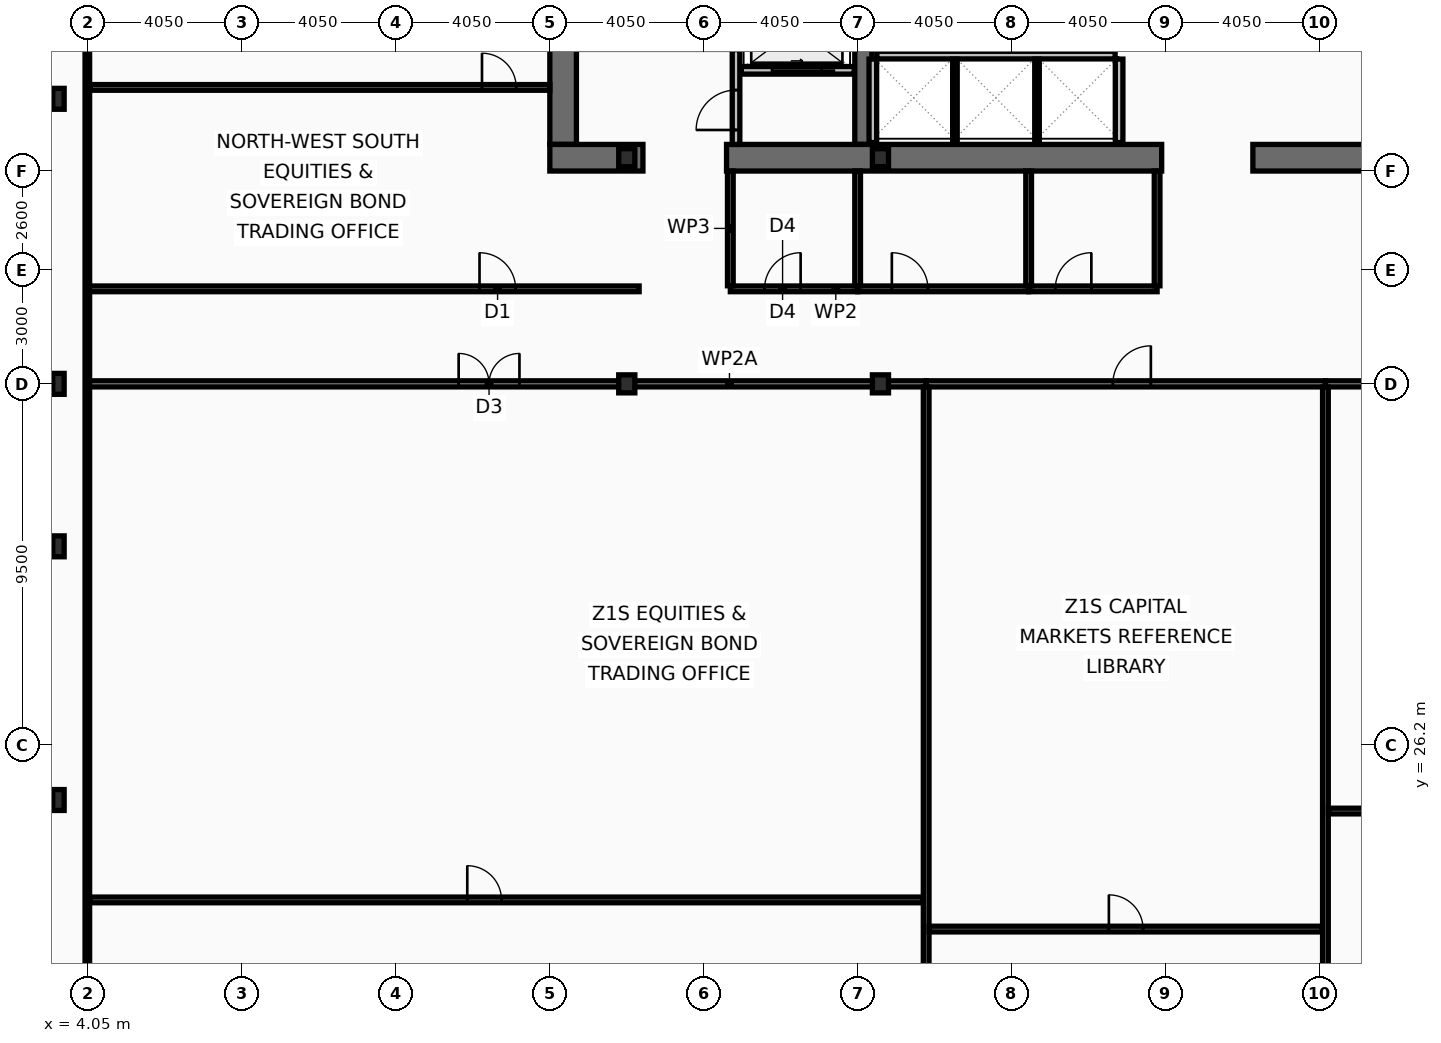
"""IFC4 building model, lengths in metres.
Left out: names, types, materials, properties, quantities, classifications, styles, units other than length and angle.
Written with IfcOpenShell. Run it as: python <this file> out.ifc"""

import sys

from ifc_helpers import new_model, si_unit, direction, frame, frame_2d, origin, origin_2d, place, context, subcontext, project, spatial, rectangle, i_section, extrude, element, fill, save


model = new_model("IFC4")
c1 = context("Model", 3, precision=1e-05, world=origin(), true_north=direction((0.0, 1.0)))
c2 = subcontext(c1, "Body", "Model", "MODEL_VIEW")
j1 = project(units=[si_unit("LENGTHUNIT", "METRE"), si_unit("PLANEANGLEUNIT", "RADIAN")], contexts=[c1])
p1 = place(None, origin())
s1 = spatial("IfcSite", under=j1, at=p1, CompositionType="ELEMENT")
p2 = place(p1, origin())
s2 = spatial("IfcBuilding", under=s1, at=p2, CompositionType="ELEMENT")
p3 = place(p2, frame((0.0, 0.0, 90.6)))
s3 = spatial("IfcBuildingStorey", under=s2, at=p3, CompositionType="ELEMENT", Elevation=90.6)
p4 = place(p3, frame((16.55, 42.0, 0.0), z_axis=(0.0, 0.0, 1.0), x_axis=(0.0, 1.0, 0.0)))
e1 = element("IfcWall", 1, at=p4, inside=s3, PredefinedType="SHEAR", context=c2, shape_type="SweptSolid", body=[
    extrude(rectangle(XDim=11.0, YDim=0.7, at=frame_2d((5.5, 0.0))), origin(), (0.0, 0.0, 1.0), 3.82),
])
p5 = place(p3, frame((24.45, 42.0, 0.0), z_axis=(0.0, 0.0, 1.0), x_axis=(0.0, 1.0, 0.0)))
e2 = element("IfcWall", 2, at=p5, inside=s3, PredefinedType="SHEAR", context=c2, shape_type="SweptSolid", body=[
    extrude(rectangle(XDim=11.0, YDim=0.45, at=frame_2d((5.5, 0.0))), origin(), (0.0, 0.0, 1.0), 3.82),
])
p6 = place(p3, frame((18.65, 41.65, 0.0), z_axis=(0.0, 0.0, 1.0), x_axis=(-1.0, 0.0, 0.0)))
e3 = element("IfcWall", 3, at=p6, inside=s3, PredefinedType="SHEAR", context=c2, shape_type="SweptSolid", body=[
    extrude(rectangle(XDim=2.45, YDim=0.7, at=frame_2d((1.225, 0.0))), origin(), (0.0, 0.0, 1.0), 3.82),
])
p7 = place(p3, frame((32.3, 41.65, 0.0), z_axis=(0.0, 0.0, 1.0), x_axis=(-1.0, 0.0, 0.0)))
e4 = element("IfcWall", 4, at=p7, inside=s3, PredefinedType="SHEAR", context=c2, shape_type="SweptSolid", body=[
    extrude(rectangle(XDim=11.45, YDim=0.7, at=frame_2d((5.725, 0.0))), origin(), (0.0, 0.0, 1.0), 3.82),
])
p8 = place(p3, frame((38.45, 41.65, 0.0), z_axis=(0.0, 0.0, 1.0), x_axis=(-1.0, 0.0, 0.0)))
e5 = element("IfcWall", 5, at=p8, inside=s3, PredefinedType="SHEAR", context=c2, shape_type="SweptSolid", body=[
    extrude(rectangle(XDim=3.75, YDim=0.7, at=frame_2d((1.875, 0.0))), origin(), (0.0, 0.0, 1.0), 3.82),
])
for number, where, z_axis, x_axis in (
    (6, (3.27, 24.75, 0.0), (0.0, 0.0, 1.0), (1.0, 0.0, 0.0)),
    (7, (3.27, 31.425, 0.0), (0.0, 0.0, 1.0), (1.0, 0.0, 0.0)),
    (8, (3.27, 35.7, 0.0), (0.0, 0.0, 1.0), (1.0, 0.0, 0.0)),
    (9, (3.27, 43.2, 0.0), (0.0, 0.0, 1.0), (1.0, 0.0, 0.0)),
):
    element("IfcColumn", number, at=place(p3, frame(where, z_axis=z_axis, x_axis=x_axis)), inside=s3, PredefinedType="COLUMN", context=c2, shape_type="SweptSolid", body=[
        extrude(i_section(OverallWidth=0.3, OverallDepth=0.55, WebThickness=0.015, FlangeThickness=0.029, at=origin_2d()), origin(), (0.0, 0.0, 1.0), 4.0),
    ])
for number, where, z_axis, x_axis in (
    (10, (18.225, 35.7, 0.0), (0.0, 0.0, 1.0), (1.0, 0.0, 0.0)),
    (11, (18.225, 41.65, 0.0), (0.0, 0.0, 1.0), (1.0, 0.0, 0.0)),
    (12, (24.9, 35.7, 0.0), (0.0, 0.0, 1.0), (1.0, 0.0, 0.0)),
    (13, (24.9, 41.65, 0.0), (0.0, 0.0, 1.0), (1.0, 0.0, 0.0)),
):
    element("IfcColumn", number, at=place(p3, frame(where, z_axis=z_axis, x_axis=x_axis)), inside=s3, PredefinedType="COLUMN", context=c2, shape_type="SweptSolid", body=[
        extrude(i_section(OverallWidth=0.424, OverallDepth=0.474, WebThickness=0.048, FlangeThickness=0.077, at=origin_2d()), origin(), (0.0, 0.0, 1.0), 4.0),
    ])
p9 = place(p3, frame((24.21, 43.95, 0.0), z_axis=(0.0, 0.0, 1.0), x_axis=(-1.0, 0.0, 0.0)))
e14 = element("IfcWall", 14, at=p9, inside=s3, PredefinedType="PARTITIONING", context=c2, shape_type="SweptSolid", body=[
    extrude(rectangle(XDim=2.97, YDim=0.2, at=frame_2d((1.485, 0.0))), origin(), (0.0, 0.0, 1.0), 3.82),
])
p10 = place(p9, frame((0.86, 0.0, 0.0)))
e15 = element("IfcOpeningElement", 15, at=p10, cuts=e14, PredefinedType="OPENING", context=c2, shape_type="SweptSolid", body=[
    extrude(rectangle(XDim=1.3, YDim=2.18, at=frame_2d((0.65, 1.09))), frame((0.0, 0.11, 0.0), z_axis=(0.0, -1.0, 0.0), x_axis=(1.0, 0.0, 0.0)), (0.0, 0.0, 1.0), 0.22),
])
p11 = place(p3, frame((21.1, 42.0, 0.0), z_axis=(0.0, 0.0, 1.0), x_axis=(0.0, 1.0, 0.0)))
e16 = element("IfcWall", 16, at=p11, inside=s3, PredefinedType="PARTITIONING", context=c2, shape_type="SweptSolid", body=[
    extrude(rectangle(XDim=2.495, YDim=0.2, at=frame_2d((1.248, 0.0))), origin(), (0.0, 0.0, 1.0), 3.82),
])
p12 = place(p11, frame((0.38, 0.0, 0.0)))
e17 = element("IfcOpeningElement", 17, at=p12, cuts=e16, PredefinedType="OPENING", context=c2, shape_type="SweptSolid", body=[
    extrude(rectangle(XDim=1.05, YDim=2.15, at=frame_2d((0.525, 1.075))), frame((0.0, 0.11, 0.0), z_axis=(0.0, -1.0, 0.0), x_axis=(1.0, 0.0, 0.0)), (0.0, 0.0, 1.0), 0.22),
])
p13 = place(p3, frame((24.805, 44.35, 0.0), z_axis=(0.0, 0.0, 1.0), x_axis=(1.0, 0.0, 0.0)))
e18 = element("IfcWall", 18, at=p13, inside=s3, PredefinedType="PARTITIONING", context=c2, shape_type="SweptSolid", body=[
    extrude(rectangle(XDim=6.27, YDim=0.2, at=frame_2d((3.135, 0.0))), origin(), (0.0, 0.0, 1.0), 3.82),
])
for number, where, z_axis, x_axis in (
    (19, (24.7, 42.05, 0.0), (0.0, 0.0, 1.0), (0.0, 1.0, 0.0)),
    (20, (31.18, 42.05, 0.0), (0.0, 0.0, 1.0), (0.0, 1.0, 0.0)),
):
    element("IfcWall", number, at=place(p3, frame(where, z_axis=z_axis, x_axis=x_axis)), inside=s3, PredefinedType="PARTITIONING", context=c2, shape_type="SweptSolid", body=[
        extrude(rectangle(XDim=2.195, YDim=0.2, at=frame_2d((1.098, 0.0))), origin(), (0.0, 0.0, 1.0), 3.82),
    ])
for number, where, z_axis, x_axis in (
    (21, (26.86, 42.05, 0.0), (0.0, 0.0, 1.0), (0.0, 1.0, 0.0)),
    (22, (29.02, 42.05, 0.0), (0.0, 0.0, 1.0), (0.0, 1.0, 0.0)),
):
    element("IfcWall", number, at=place(p3, frame(where, z_axis=z_axis, x_axis=x_axis)), inside=s3, PredefinedType="PARTITIONING", context=c2, shape_type="SweptSolid", body=[
        extrude(rectangle(XDim=2.195, YDim=0.12, at=frame_2d((1.098, 0.0))), origin(), (0.0, 0.0, 1.0), 3.82),
    ])
p14 = place(p3, frame((20.95, 38.2, 0.0), z_axis=(0.0, 0.0, 1.0), x_axis=(1.0, 0.0, 0.0)))
e23 = element("IfcWall", 23, at=p14, inside=s3, PredefinedType="PARTITIONING", context=c2, shape_type="SweptSolid", body=[
    extrude(rectangle(XDim=3.35, YDim=0.15, at=frame_2d((1.675, 0.0))), origin(), (0.0, 0.0, 1.0), 3.82),
])
p15 = place(p14, frame((0.9, 0.0, 0.0)))
e24 = element("IfcOpeningElement", 24, at=p15, cuts=e23, PredefinedType="OPENING", context=c2, shape_type="SweptSolid", body=[
    extrude(rectangle(XDim=0.95, YDim=2.05, at=frame_2d((0.475, 1.025))), frame((0.0, 0.085, 0.0), z_axis=(0.0, -1.0, 0.0), x_axis=(1.0, 0.0, 0.0)), (0.0, 0.0, 1.0), 0.17),
])
p16 = place(p3, frame((24.3, 38.2, 0.0), z_axis=(0.0, 0.0, 1.0), x_axis=(1.0, 0.0, 0.0)))
e25 = element("IfcWall", 25, at=p16, inside=s3, PredefinedType="PARTITIONING", context=c2, shape_type="SweptSolid", body=[
    extrude(rectangle(XDim=4.5, YDim=0.15, at=frame_2d((2.25, 0.0))), origin(), (0.0, 0.0, 1.0), 3.01),
])
p17 = place(p16, frame((0.9, 0.0, 0.0)))
e26 = element("IfcOpeningElement", 26, at=p17, cuts=e25, PredefinedType="OPENING", context=c2, shape_type="SweptSolid", body=[
    extrude(rectangle(XDim=0.95, YDim=2.05, at=frame_2d((0.475, 1.025))), frame((0.0, 0.085, 0.0), z_axis=(0.0, -1.0, 0.0), x_axis=(1.0, 0.0, 0.0)), (0.0, 0.0, 1.0), 0.17),
])
p18 = place(p3, frame((28.8, 38.2, 0.0), z_axis=(0.0, 0.0, 1.0), x_axis=(1.0, 0.0, 0.0)))
e27 = element("IfcWall", 27, at=p18, inside=s3, PredefinedType="PARTITIONING", context=c2, shape_type="SweptSolid", body=[
    extrude(rectangle(XDim=3.38, YDim=0.15, at=frame_2d((1.69, 0.0))), origin(), (0.0, 0.0, 1.0), 3.01),
])
p19 = place(p18, frame((0.7, 0.0, 0.0)))
e28 = element("IfcOpeningElement", 28, at=p19, cuts=e27, PredefinedType="OPENING", context=c2, shape_type="SweptSolid", body=[
    extrude(rectangle(XDim=0.95, YDim=2.05, at=frame_2d((0.475, 1.025))), frame((0.0, 0.085, 0.0), z_axis=(0.0, -1.0, 0.0), x_axis=(1.0, 0.0, 0.0)), (0.0, 0.0, 1.0), 0.17),
])
for number, where, z_axis, x_axis in (
    (29, (20.95, 38.28, 0.0), (0.0, 0.0, 1.0), (0.0, 1.0, 0.0)),
    (30, (24.3, 38.28, 0.0), (0.0, 0.0, 1.0), (0.0, 1.0, 0.0)),
    (31, (28.8, 38.28, 0.0), (0.0, 0.0, 1.0), (0.0, 1.0, 0.0)),
    (32, (32.18, 38.28, 0.0), (0.0, 0.0, 1.0), (0.0, 1.0, 0.0)),
):
    element("IfcWall", number, at=place(p3, frame(where, z_axis=z_axis, x_axis=x_axis)), inside=s3, PredefinedType="PARTITIONING", context=c2, shape_type="SweptSolid", body=[
        extrude(rectangle(XDim=3.02, YDim=0.15, at=frame_2d((1.51, 0.0))), origin(), (0.0, 0.0, 1.0), 3.82),
    ])
p20 = place(p3, frame((4.03, 38.2, 0.0), z_axis=(0.0, 0.0, 1.0), x_axis=(1.0, 0.0, 0.0)))
e33 = element("IfcWall", 33, at=p20, inside=s3, PredefinedType="PARTITIONING", context=c2, shape_type="SweptSolid", body=[
    extrude(rectangle(XDim=14.52, YDim=0.15, at=frame_2d((7.26, 0.0))), origin(), (0.0, 0.0, 1.0), 3.01),
])
p21 = place(p20, frame((10.32, 0.0, 0.0)))
e34 = element("IfcOpeningElement", 34, at=p21, cuts=e33, PredefinedType="OPENING", context=c2, shape_type="SweptSolid", body=[
    extrude(rectangle(XDim=0.95, YDim=2.05, at=frame_2d((0.475, 1.025))), frame((0.0, 0.085, 0.0), z_axis=(0.0, -1.0, 0.0), x_axis=(1.0, 0.0, 0.0)), (0.0, 0.0, 1.0), 0.17),
])
p22 = place(p3, frame((4.095, 43.5, 0.0), z_axis=(0.0, 0.0, 1.0), x_axis=(1.0, 0.0, 0.0)))
e35 = element("IfcWall", 35, at=p22, inside=s3, PredefinedType="PARTITIONING", context=c2, shape_type="SweptSolid", body=[
    extrude(rectangle(XDim=12.105, YDim=0.15, at=frame_2d((6.052, 0.0))), origin(), (0.0, 0.0, 1.0), 3.01),
])
p23 = place(p22, frame((10.32, 0.0, 0.0)))
e36 = element("IfcOpeningElement", 36, at=p23, cuts=e35, PredefinedType="OPENING", context=c2, shape_type="SweptSolid", body=[
    extrude(rectangle(XDim=0.9, YDim=2.05, at=frame_2d((0.45, 1.025))), frame((0.0, 0.085, 0.0), z_axis=(0.0, -1.0, 0.0), x_axis=(1.0, 0.0, 0.0)), (0.0, 0.0, 1.0), 0.17),
])
p24 = place(p3, frame((4.03, 35.7, 0.0), z_axis=(0.0, 0.0, 1.0), x_axis=(1.0, 0.0, 0.0)))
e37 = element("IfcWall", 37, at=p24, inside=s3, PredefinedType="PARTITIONING", context=c2, shape_type="SweptSolid", body=[
    extrude(rectangle(XDim=22.073, YDim=0.16, at=frame_2d((11.037, 0.0))), origin(), (0.0, 0.0, 1.0), 3.01),
])
p25 = place(p24, frame((9.771, 0.0, 0.0)))
e38 = element("IfcOpeningElement", 38, at=p25, cuts=e37, PredefinedType="OPENING", context=c2, shape_type="SweptSolid", body=[
    extrude(rectangle(XDim=1.6, YDim=2.15, at=frame_2d((0.8, 1.075))), frame((0.0, 0.09, 0.0), z_axis=(0.0, -1.0, 0.0), x_axis=(1.0, 0.0, 0.0)), (0.0, 0.0, 1.0), 0.18),
])
p26 = place(p3, frame((4.095, 22.121, 0.0), z_axis=(0.0, 0.0, 1.0), x_axis=(1.0, 0.0, 0.0)))
e39 = element("IfcWall", 39, at=p26, inside=s3, PredefinedType="PARTITIONING", context=c2, shape_type="SweptSolid", body=[
    extrude(rectangle(XDim=21.928, YDim=0.15, at=frame_2d((10.964, 0.0))), origin(), (0.0, 0.0, 1.0), 3.01),
])
p27 = place(p26, frame((9.933, 0.0, 0.0)))
e40 = element("IfcOpeningElement", 40, at=p27, cuts=e39, PredefinedType="OPENING", context=c2, shape_type="SweptSolid", body=[
    extrude(rectangle(XDim=0.9, YDim=2.05, at=frame_2d((0.45, 1.025))), frame((0.0, 0.085, 0.0), z_axis=(0.0, -1.0, 0.0), x_axis=(1.0, 0.0, 0.0)), (0.0, 0.0, 1.0), 0.17),
])
p28 = place(p3, frame((26.103, 35.7, 0.0), z_axis=(0.0, 0.0, 1.0), x_axis=(1.0, 0.0, 0.0)))
e41 = element("IfcWall", 41, at=p28, inside=s3, PredefinedType="PARTITIONING", context=c2, shape_type="SweptSolid", body=[
    extrude(rectangle(XDim=10.506, YDim=0.16, at=frame_2d((5.253, 0.0))), origin(), (0.0, 0.0, 1.0), 3.01),
])
p29 = place(p28, frame((4.913, 0.0, 0.0)))
e42 = element("IfcOpeningElement", 42, at=p29, cuts=e41, PredefinedType="OPENING", context=c2, shape_type="SweptSolid", body=[
    extrude(rectangle(XDim=1.0, YDim=2.05, at=frame_2d((0.5, 1.025))), frame((0.0, 0.09, 0.0), z_axis=(0.0, -1.0, 0.0), x_axis=(1.0, 0.0, 0.0)), (0.0, 0.0, 1.0), 0.18),
])
p30 = place(p3, frame((26.103, 10.665, 0.0), z_axis=(0.0, 0.0, 1.0), x_axis=(0.0, 1.0, 0.0)))
e43 = element("IfcWall", 43, at=p30, inside=s3, PredefinedType="PARTITIONING", context=c2, shape_type="SweptSolid", body=[
    extrude(rectangle(XDim=24.95, YDim=0.15, at=frame_2d((12.475, 0.0))), origin(), (0.0, 0.0, 1.0), 3.26),
])
p31 = place(p3, frame((26.183, 21.354, 0.0), z_axis=(0.0, 0.0, 1.0), x_axis=(1.0, 0.0, 0.0)))
e44 = element("IfcWall", 44, at=p31, inside=s3, PredefinedType="PARTITIONING", context=c2, shape_type="SweptSolid", body=[
    extrude(rectangle(XDim=10.346, YDim=0.15, at=frame_2d((5.173, 0.0))), origin(), (0.0, 0.0, 1.0), 3.01),
])
p32 = place(p31, frame((4.728, 0.0, 0.0)))
e45 = element("IfcOpeningElement", 45, at=p32, cuts=e44, PredefinedType="OPENING", context=c2, shape_type="SweptSolid", body=[
    extrude(rectangle(XDim=0.9, YDim=2.05, at=frame_2d((0.45, 1.025))), frame((0.0, 0.085, 0.0), z_axis=(0.0, -1.0, 0.0), x_axis=(1.0, 0.0, 0.0)), (0.0, 0.0, 1.0), 0.17),
])
p33 = place(p3, frame((36.609, 35.7, 0.0), z_axis=(0.0, 0.0, 1.0), x_axis=(1.0, 0.0, 0.0)))
e46 = element("IfcWall", 46, at=p33, inside=s3, PredefinedType="PARTITIONING", context=c2, shape_type="SweptSolid", body=[
    extrude(rectangle(XDim=13.69, YDim=0.16, at=frame_2d((6.845, 0.0))), origin(), (0.0, 0.0, 1.0), 3.01),
])
p34 = place(p33, frame((6.25, 0.0, 0.0)))
e47 = element("IfcOpeningElement", 47, at=p34, cuts=e46, PredefinedType="OPENING", context=c2, shape_type="SweptSolid", body=[
    extrude(rectangle(XDim=1.0, YDim=2.05, at=frame_2d((0.5, 1.025))), frame((0.0, 0.09, 0.0), z_axis=(0.0, -1.0, 0.0), x_axis=(1.0, 0.0, 0.0)), (0.0, 0.0, 1.0), 0.18),
])
p35 = place(p3, frame((36.609, 10.665, 0.0), z_axis=(0.0, 0.0, 1.0), x_axis=(0.0, 1.0, 0.0)))
e48 = element("IfcWall", 48, at=p35, inside=s3, PredefinedType="PARTITIONING", context=c2, shape_type="SweptSolid", body=[
    extrude(rectangle(XDim=24.95, YDim=0.15, at=frame_2d((12.475, 0.0))), origin(), (0.0, 0.0, 1.0), 3.26),
])
p36 = place(p3, frame((36.689, 24.459, 0.0), z_axis=(0.0, 0.0, 1.0), x_axis=(1.0, 0.0, 0.0)))
e49 = element("IfcWall", 49, at=p36, inside=s3, PredefinedType="PARTITIONING", context=c2, shape_type="SweptSolid", body=[
    extrude(rectangle(XDim=13.53, YDim=0.15, at=frame_2d((6.765, 0.0))), origin(), (0.0, 0.0, 1.0), 3.01),
])
p37 = place(p36, frame((6.16, 0.0, 0.0)))
e50 = element("IfcOpeningElement", 50, at=p37, cuts=e49, PredefinedType="OPENING", context=c2, shape_type="SweptSolid", body=[
    extrude(rectangle(XDim=0.9, YDim=2.05, at=frame_2d((0.45, 1.025))), frame((0.0, 0.085, 0.0), z_axis=(0.0, -1.0, 0.0), x_axis=(1.0, 0.0, 0.0)), (0.0, 0.0, 1.0), 0.17),
])
p38 = place(p3, frame((4.03, 10.665, 0.0), z_axis=(0.0, 0.0, 1.0), x_axis=(0.0, 1.0, 0.0)))
e51 = element("IfcWall", 51, at=p38, inside=s3, PredefinedType="PARTITIONING", context=c2, shape_type="SweptSolid", body=[
    extrude(rectangle(XDim=42.11, YDim=0.12, at=frame_2d((21.055, 0.0))), origin(), (0.0, 0.0, 1.0), 3.01),
])
p39 = place(p10, origin())
e52 = element("IfcDoor", 52, at=p39, inside=s3, OperationType="SLIDING_TO_LEFT", PredefinedType="DOOR", context=c2, shape_type="SweptSolid", body=[
    extrude(rectangle(XDim=1.3, YDim=2.18, at=frame_2d((0.65, 1.09))), frame((0.0, 0.025, 0.0), z_axis=(0.0, -1.0, 0.0), x_axis=(1.0, 0.0, 0.0)), (0.0, 0.0, 1.0), 0.05),
])
fill(e15, e52)
p40 = place(p12, origin())
e53 = element("IfcDoor", 53, at=p40, inside=s3, OperationType="SINGLE_SWING_LEFT", PredefinedType="DOOR", context=c2, shape_type="SweptSolid", body=[
    extrude(rectangle(XDim=1.05, YDim=2.15, at=frame_2d((0.525, 1.075))), frame((0.0, 0.025, 0.0), z_axis=(0.0, -1.0, 0.0), x_axis=(1.0, 0.0, 0.0)), (0.0, 0.0, 1.0), 0.05),
])
fill(e17, e53)
p41 = place(p15, origin())
e54 = element("IfcDoor", 54, at=p41, inside=s3, OperationType="SINGLE_SWING_RIGHT", PredefinedType="DOOR", context=c2, shape_type="SweptSolid", body=[
    extrude(rectangle(XDim=0.95, YDim=2.05, at=frame_2d((0.475, 1.025))), frame((0.0, 0.025, 0.0), z_axis=(0.0, -1.0, 0.0), x_axis=(1.0, 0.0, 0.0)), (0.0, 0.0, 1.0), 0.05),
])
fill(e24, e54)
p42 = place(p17, origin())
e55 = element("IfcDoor", 55, at=p42, inside=s3, OperationType="SINGLE_SWING_LEFT", PredefinedType="DOOR", context=c2, shape_type="SweptSolid", body=[
    extrude(rectangle(XDim=0.95, YDim=2.05, at=frame_2d((0.475, 1.025))), frame((0.0, 0.025, 0.0), z_axis=(0.0, -1.0, 0.0), x_axis=(1.0, 0.0, 0.0)), (0.0, 0.0, 1.0), 0.05),
])
fill(e26, e55)
p43 = place(p19, origin())
e56 = element("IfcDoor", 56, at=p43, inside=s3, OperationType="SINGLE_SWING_RIGHT", PredefinedType="DOOR", context=c2, shape_type="SweptSolid", body=[
    extrude(rectangle(XDim=0.95, YDim=2.05, at=frame_2d((0.475, 1.025))), frame((0.0, 0.025, 0.0), z_axis=(0.0, -1.0, 0.0), x_axis=(1.0, 0.0, 0.0)), (0.0, 0.0, 1.0), 0.05),
])
fill(e28, e56)
p44 = place(p21, origin())
e57 = element("IfcDoor", 57, at=p44, inside=s3, OperationType="SINGLE_SWING_LEFT", PredefinedType="DOOR", context=c2, shape_type="SweptSolid", body=[
    extrude(rectangle(XDim=0.95, YDim=2.05, at=frame_2d((0.475, 1.025))), frame((0.0, 0.025, 0.0), z_axis=(0.0, -1.0, 0.0), x_axis=(1.0, 0.0, 0.0)), (0.0, 0.0, 1.0), 0.05),
])
fill(e34, e57)
p45 = place(p23, origin())
e58 = element("IfcDoor", 58, at=p45, inside=s3, OperationType="SINGLE_SWING_LEFT", PredefinedType="DOOR", context=c2, shape_type="SweptSolid", body=[
    extrude(rectangle(XDim=0.9, YDim=2.05, at=frame_2d((0.45, 1.025))), frame((0.0, 0.025, 0.0), z_axis=(0.0, -1.0, 0.0), x_axis=(1.0, 0.0, 0.0)), (0.0, 0.0, 1.0), 0.05),
])
fill(e36, e58)
p46 = place(p25, origin())
e59 = element("IfcDoor", 59, at=p46, inside=s3, OperationType="DOUBLE_DOOR_SINGLE_SWING", PredefinedType="DOOR", context=c2, shape_type="SweptSolid", body=[
    extrude(rectangle(XDim=1.6, YDim=2.15, at=frame_2d((0.8, 1.075))), frame((0.0, 0.025, 0.0), z_axis=(0.0, -1.0, 0.0), x_axis=(1.0, 0.0, 0.0)), (0.0, 0.0, 1.0), 0.05),
])
fill(e38, e59)
p47 = place(p27, origin())
e60 = element("IfcDoor", 60, at=p47, inside=s3, OperationType="SINGLE_SWING_LEFT", PredefinedType="DOOR", context=c2, shape_type="SweptSolid", body=[
    extrude(rectangle(XDim=0.9, YDim=2.05, at=frame_2d((0.45, 1.025))), frame((0.0, 0.025, 0.0), z_axis=(0.0, -1.0, 0.0), x_axis=(1.0, 0.0, 0.0)), (0.0, 0.0, 1.0), 0.05),
])
fill(e40, e60)
p48 = place(p29, origin())
e61 = element("IfcDoor", 61, at=p48, inside=s3, OperationType="SINGLE_SWING_RIGHT", PredefinedType="DOOR", context=c2, shape_type="SweptSolid", body=[
    extrude(rectangle(XDim=1.0, YDim=2.05, at=frame_2d((0.5, 1.025))), frame((0.0, 0.025, 0.0), z_axis=(0.0, -1.0, 0.0), x_axis=(1.0, 0.0, 0.0)), (0.0, 0.0, 1.0), 0.05),
])
fill(e42, e61)
p49 = place(p32, origin())
e62 = element("IfcDoor", 62, at=p49, inside=s3, OperationType="SINGLE_SWING_LEFT", PredefinedType="DOOR", context=c2, shape_type="SweptSolid", body=[
    extrude(rectangle(XDim=0.9, YDim=2.05, at=frame_2d((0.45, 1.025))), frame((0.0, 0.025, 0.0), z_axis=(0.0, -1.0, 0.0), x_axis=(1.0, 0.0, 0.0)), (0.0, 0.0, 1.0), 0.05),
])
fill(e45, e62)
save(model, sys.argv[1])
